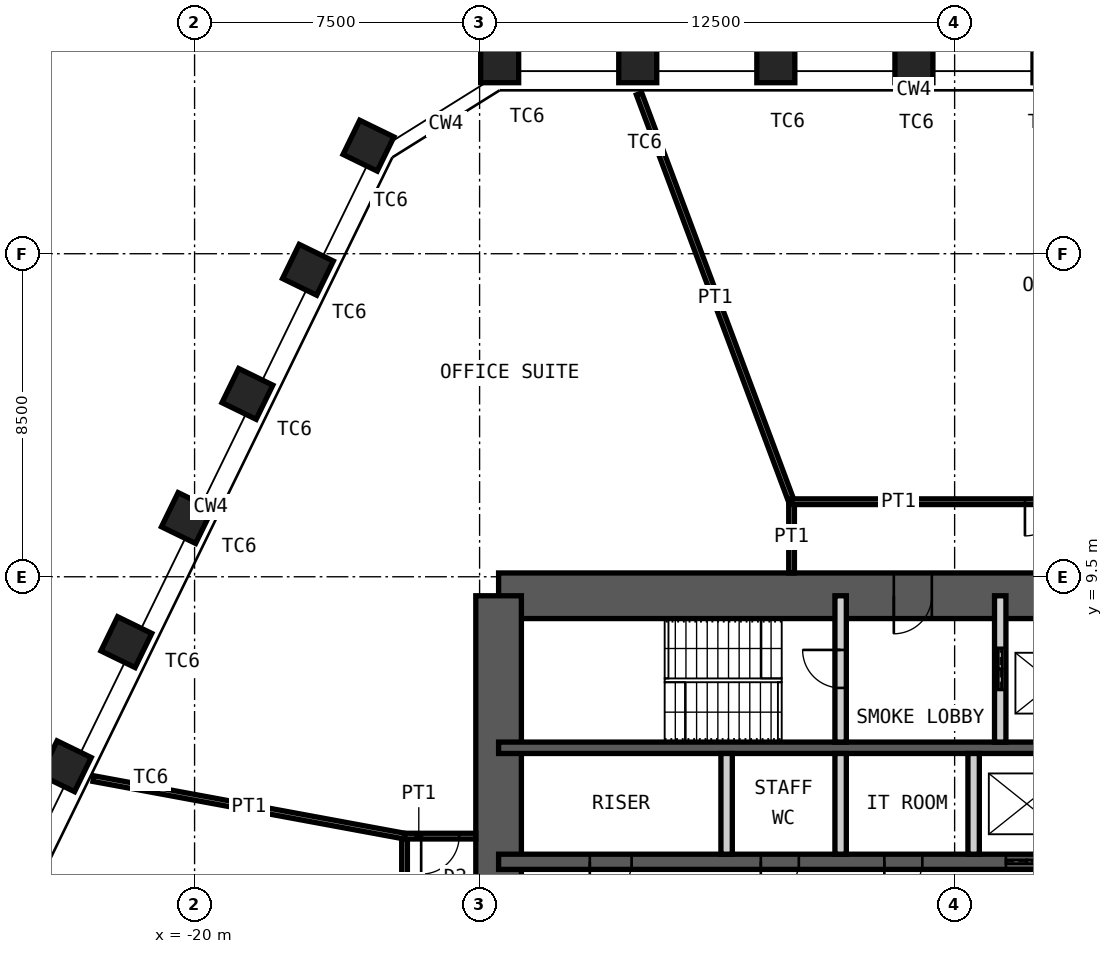
"""IFC4 building model, lengths in metres.
Left out: names, types, materials, properties, quantities, classifications, styles, units other than length and angle.
Written with IfcOpenShell. Run it as: python <this file> out.ifc"""

import sys

from ifc_helpers import new_model, si_unit, direction, frame, frame_2d, origin, origin_2d, place, context, subcontext, project, spatial, rectangle, hollow_rectangle, extrude, element, fill, save


model = new_model("IFC4")
c1 = context("Model", 3, precision=1e-05, world=origin(), true_north=direction((0.0, 1.0)))
c2 = subcontext(c1, "Body", "Model", "MODEL_VIEW")
j1 = project(units=[si_unit("LENGTHUNIT", "METRE"), si_unit("PLANEANGLEUNIT", "RADIAN")], contexts=[c1])
p1 = place(None, origin())
s1 = spatial("IfcSite", under=j1, at=p1, CompositionType="ELEMENT")
p2 = place(p1, origin())
s2 = spatial("IfcBuilding", under=s1, at=p2, CompositionType="ELEMENT")
p3 = place(p2, frame((0.0, 0.0, 247.6)))
s3 = spatial("IfcBuildingStorey", under=s2, at=p3, CompositionType="ELEMENT", Elevation=247.6)
for number, where, z_axis, x_axis in (
    (1, (-11.972, 23.0, 0.0), (0.0, 0.0, 1.0), (-1.0, 0.0, 0.0)),
    (2, (-8.338, 23.0, 0.0), (0.0, 0.0, 1.0), (-1.0, 0.0, 0.0)),
    (3, (-4.705, 23.0, 0.0), (0.0, 0.0, 1.0), (-1.0, 0.0, 0.0)),
    (4, (-1.071, 23.0, 0.0), (0.0, 0.0, 1.0), (-1.0, 0.0, 0.0)),
    (5, (-23.388, 4.514, 0.0), (0.0, 0.0, 1.0), (-0.438, -0.899, 0.0)),
    (6, (-21.795, 7.78, 0.0), (0.0, 0.0, 1.0), (-0.438, -0.899, 0.0)),
    (7, (-20.203, 11.045, 0.0), (0.0, 0.0, 1.0), (-0.438, -0.899, 0.0)),
    (8, (-18.61, 14.311, 0.0), (0.0, 0.0, 1.0), (-0.438, -0.899, 0.0)),
    (9, (-17.017, 17.577, 0.0), (0.0, 0.0, 1.0), (-0.438, -0.899, 0.0)),
    (10, (-15.424, 20.843, 0.0), (0.0, 0.0, 1.0), (-0.438, -0.899, 0.0)),
):
    element("IfcColumn", number, at=place(p3, frame(where, z_axis=z_axis, x_axis=x_axis)), inside=s3, PredefinedType="COLUMN", context=c2, shape_type="SweptSolid", body=[
        extrude(hollow_rectangle(XDim=1.0, YDim=1.0, WallThickness=0.06, at=origin_2d()), origin(), (0.0, 0.0, 1.0), 4.2),
    ])
p4 = place(p3, frame((-12.0, 9.0, 0.0), z_axis=(0.0, 0.0, 1.0), x_axis=(1.0, 0.0, 0.0)))
e11 = element("IfcWall", 11, at=p4, inside=s3, PredefinedType="SHEAR", context=c2, shape_type="SweptSolid", body=[
    extrude(rectangle(XDim=24.0, YDim=1.2, at=frame_2d((12.0, 0.0))), origin(), (0.0, 0.0, 1.0), 4.2),
])
p5 = place(p4, frame((10.4, 0.0, 0.0)))
e12 = element("IfcOpeningElement", 12, at=p5, cuts=e11, PredefinedType="OPENING", context=c2, shape_type="SweptSolid", body=[
    extrude(rectangle(XDim=1.0, YDim=2.1, at=frame_2d((0.5, 1.05))), frame((0.0, 0.61, 0.0), z_axis=(0.0, -1.0, 0.0), x_axis=(1.0, 0.0, 0.0)), (0.0, 0.0, 1.0), 1.22),
])
p6 = place(p4, frame((17.6, 0.0, 0.0)))
e13 = element("IfcOpeningElement", 13, at=p6, cuts=e11, PredefinedType="OPENING", context=c2, shape_type="SweptSolid", body=[
    extrude(rectangle(XDim=0.9, YDim=2.1, at=frame_2d((0.45, 1.05))), frame((0.0, 0.61, 0.0), z_axis=(0.0, -1.0, 0.0), x_axis=(1.0, 0.0, 0.0)), (0.0, 0.0, 1.0), 1.22),
])
p7 = place(p4, frame((21.9, 0.0, 0.0)))
e14 = element("IfcOpeningElement", 14, at=p7, cuts=e11, PredefinedType="OPENING", context=c2, shape_type="SweptSolid", body=[
    extrude(rectangle(XDim=0.9, YDim=2.1, at=frame_2d((0.45, 1.05))), frame((0.0, 0.61, 0.0), z_axis=(0.0, -1.0, 0.0), x_axis=(1.0, 0.0, 0.0)), (0.0, 0.0, 1.0), 1.22),
])
p8 = place(p3, frame((-12.0, -9.0, 0.0), z_axis=(0.0, 0.0, 1.0), x_axis=(0.0, 1.0, 0.0)))
e15 = element("IfcWall", 15, at=p8, inside=s3, PredefinedType="SHEAR", context=c2, shape_type="SweptSolid", body=[
    extrude(rectangle(XDim=18.0, YDim=1.2, at=frame_2d((9.0, 0.0))), origin(), (0.0, 0.0, 1.0), 4.2),
])
p9 = place(p8, frame((8.1, 0.0, 0.0)))
e16 = element("IfcOpeningElement", 16, at=p9, cuts=e15, PredefinedType="OPENING", context=c2, shape_type="SweptSolid", body=[
    extrude(rectangle(XDim=1.8, YDim=2.1, at=frame_2d((0.9, 1.05))), frame((0.0, 0.61, 0.0), z_axis=(0.0, -1.0, 0.0), x_axis=(1.0, 0.0, 0.0)), (0.0, 0.0, 1.0), 1.22),
])
p10 = place(p3, frame((-12.0, 5.0, 0.0), z_axis=(0.0, 0.0, 1.0), x_axis=(1.0, 0.0, 0.0)))
e17 = element("IfcWall", 17, at=p10, inside=s3, PredefinedType="SHEAR", context=c2, shape_type="SweptSolid", body=[
    extrude(rectangle(XDim=24.0, YDim=0.3, at=frame_2d((12.0, 0.0))), origin(), (0.0, 0.0, 1.0), 4.2),
])
p11 = place(p3, frame((-12.0, 2.0, 0.0), z_axis=(0.0, 0.0, 1.0), x_axis=(1.0, 0.0, 0.0)))
e18 = element("IfcWall", 18, at=p11, inside=s3, PredefinedType="SHEAR", context=c2, shape_type="SweptSolid", body=[
    extrude(rectangle(XDim=24.0, YDim=0.4, at=frame_2d((12.0, 0.0))), origin(), (0.0, 0.0, 1.0), 4.2),
])
p12 = place(p11, frame((2.4, 0.0, 0.0)))
e19 = element("IfcOpeningElement", 19, at=p12, cuts=e18, PredefinedType="OPENING", context=c2, shape_type="SweptSolid", body=[
    extrude(rectangle(XDim=1.1, YDim=2.1, at=frame_2d((0.55, 1.05))), frame((0.0, 0.21, 0.0), z_axis=(0.0, -1.0, 0.0), x_axis=(1.0, 0.0, 0.0)), (0.0, 0.0, 1.0), 0.42),
])
p13 = place(p11, frame((22.0, 0.0, 0.0)))
e20 = element("IfcOpeningElement", 20, at=p13, cuts=e18, PredefinedType="OPENING", context=c2, shape_type="SweptSolid", body=[
    extrude(rectangle(XDim=1.1, YDim=2.1, at=frame_2d((0.55, 1.05))), frame((0.0, 0.21, 0.0), z_axis=(0.0, -1.0, 0.0), x_axis=(1.0, 0.0, 0.0)), (0.0, 0.0, 1.0), 0.42),
])
p14 = place(p11, frame((10.15, 0.0, 0.0)))
e21 = element("IfcOpeningElement", 21, at=p14, cuts=e18, PredefinedType="OPENING", context=c2, shape_type="SweptSolid", body=[
    extrude(rectangle(XDim=1.0, YDim=2.1, at=frame_2d((0.5, 1.05))), frame((0.0, 0.21, 0.0), z_axis=(0.0, -1.0, 0.0), x_axis=(1.0, 0.0, 0.0)), (0.0, 0.0, 1.0), 0.42),
])
p15 = place(p11, frame((6.9, 0.0, 0.0)))
e22 = element("IfcOpeningElement", 22, at=p15, cuts=e18, PredefinedType="OPENING", context=c2, shape_type="SweptSolid", body=[
    extrude(rectangle(XDim=1.0, YDim=2.1, at=frame_2d((0.5, 1.05))), frame((0.0, 0.21, 0.0), z_axis=(0.0, -1.0, 0.0), x_axis=(1.0, 0.0, 0.0)), (0.0, 0.0, 1.0), 0.42),
])
p16 = place(p11, frame((13.35, 0.0, 0.0)))
e23 = element("IfcOpeningElement", 23, at=p16, cuts=e18, PredefinedType="OPENING", context=c2, shape_type="SweptSolid", body=[
    extrude(rectangle(XDim=1.1, YDim=2.4, at=frame_2d((0.55, 1.2))), frame((0.0, 0.21, 0.0), z_axis=(0.0, -1.0, 0.0), x_axis=(1.0, 0.0, 0.0)), (0.0, 0.0, 1.0), 0.42),
])
p17 = place(p11, frame((16.15, 0.0, 0.0)))
e24 = element("IfcOpeningElement", 24, at=p17, cuts=e18, PredefinedType="OPENING", context=c2, shape_type="SweptSolid", body=[
    extrude(rectangle(XDim=1.1, YDim=2.4, at=frame_2d((0.55, 1.2))), frame((0.0, 0.21, 0.0), z_axis=(0.0, -1.0, 0.0), x_axis=(1.0, 0.0, 0.0)), (0.0, 0.0, 1.0), 0.42),
])
p18 = place(p11, frame((18.95, 0.0, 0.0)))
e25 = element("IfcOpeningElement", 25, at=p18, cuts=e18, PredefinedType="OPENING", context=c2, shape_type="SweptSolid", body=[
    extrude(rectangle(XDim=1.1, YDim=2.4, at=frame_2d((0.55, 1.2))), frame((0.0, 0.21, 0.0), z_axis=(0.0, -1.0, 0.0), x_axis=(1.0, 0.0, 0.0)), (0.0, 0.0, 1.0), 0.42),
])
p19 = place(p3, frame((-3.0, 5.15, 0.0), z_axis=(0.0, 0.0, 1.0), x_axis=(0.0, 1.0, 0.0)))
e26 = element("IfcWall", 26, at=p19, inside=s3, PredefinedType="PARTITIONING", context=c2, shape_type="SweptSolid", body=[
    extrude(rectangle(XDim=3.85, YDim=0.3, at=frame_2d((1.925, 0.0))), origin(), (0.0, 0.0, 1.0), 3.98),
])
p20 = place(p19, frame((1.425, 0.0, 0.0)))
e27 = element("IfcOpeningElement", 27, at=p20, cuts=e26, PredefinedType="OPENING", context=c2, shape_type="SweptSolid", body=[
    extrude(rectangle(XDim=1.0, YDim=2.1, at=frame_2d((0.5, 1.05))), frame((0.0, 0.16, 0.0), z_axis=(0.0, -1.0, 0.0), x_axis=(1.0, 0.0, 0.0)), (0.0, 0.0, 1.0), 0.32),
])
p21 = place(p3, frame((1.2, 5.15, 0.0), z_axis=(0.0, 0.0, 1.0), x_axis=(0.0, 1.0, 0.0)))
e28 = element("IfcWall", 28, at=p21, inside=s3, PredefinedType="PARTITIONING", context=c2, shape_type="SweptSolid", body=[
    extrude(rectangle(XDim=3.85, YDim=0.3, at=frame_2d((1.925, 0.0))), origin(), (0.0, 0.0, 1.0), 3.98),
])
p22 = place(p21, frame((1.375, 0.0, 0.0)))
e29 = element("IfcOpeningElement", 29, at=p22, cuts=e28, PredefinedType="OPENING", context=c2, shape_type="SweptSolid", body=[
    extrude(rectangle(XDim=1.1, YDim=2.4, at=frame_2d((0.55, 1.2))), frame((0.0, 0.16, 0.0), z_axis=(0.0, -1.0, 0.0), x_axis=(1.0, 0.0, 0.0)), (0.0, 0.0, 1.0), 0.32),
])
for number, where, z_axis, x_axis in (
    (30, (-6.0, 2.2, 0.0), (0.0, 0.0, 1.0), (0.0, 1.0, 0.0)),
    (31, (-3.0, 2.2, 0.0), (0.0, 0.0, 1.0), (0.0, 1.0, 0.0)),
    (32, (0.5, 2.2, 0.0), (0.0, 0.0, 1.0), (0.0, 1.0, 0.0)),
):
    element("IfcWall", number, at=place(p3, frame(where, z_axis=z_axis, x_axis=x_axis)), inside=s3, PredefinedType="PARTITIONING", context=c2, shape_type="SweptSolid", body=[
        extrude(rectangle(XDim=2.65, YDim=0.3, at=frame_2d((1.325, 0.0))), origin(), (0.0, 0.0, 1.0), 3.98),
    ])
p23 = place(p3, frame((-14.475, -3.736, 0.0), z_axis=(0.0, 0.0, 1.0), x_axis=(0.0, 1.0, 0.0)))
e33 = element("IfcWall", 33, at=p23, inside=s3, PredefinedType="PARTITIONING", context=c2, shape_type="SweptSolid", body=[
    extrude(rectangle(XDim=6.412, YDim=0.15, at=frame_2d((3.206, 0.0))), origin(), (0.0, 0.0, 1.0), 4.03),
])
p24 = place(p23, frame((2.706, 0.0, 0.0)))
e34 = element("IfcOpeningElement", 34, at=p24, cuts=e33, PredefinedType="OPENING", context=c2, shape_type="SweptSolid", body=[
    extrude(rectangle(XDim=1.0, YDim=2.4, at=frame_2d((0.5, 1.2))), frame((0.0, 0.085, 0.0), z_axis=(0.0, -1.0, 0.0), x_axis=(1.0, 0.0, 0.0)), (0.0, 0.0, 1.0), 0.17),
])
p25 = place(p3, frame((-22.661, 4.189, 0.0), z_axis=(0.0, 0.0, 1.0), x_axis=(0.983345347199, -0.181746879316, 0.0)))
e35 = element("IfcWall", 35, at=p25, inside=s3, PredefinedType="PARTITIONING", context=c2, shape_type="SweptSolid", body=[
    extrude(rectangle(XDim=8.324, YDim=0.15, at=frame_2d((4.162, 0.0))), origin(), (0.0, 0.0, 1.0), 2.93),
])
p26 = place(p3, frame((-14.475, 2.676, 0.0), z_axis=(0.0, 0.0, 1.0), x_axis=(1.0, 0.0, 0.0)))
e36 = element("IfcWall", 36, at=p26, inside=s3, PredefinedType="PARTITIONING", context=c2, shape_type="SweptSolid", body=[
    extrude(rectangle(XDim=1.875, YDim=0.15, at=frame_2d((0.938, 0.0))), origin(), (0.0, 0.0, 1.0), 2.93),
])
p27 = place(p26, frame((0.438, 0.0, 0.0)))
e37 = element("IfcOpeningElement", 37, at=p27, cuts=e36, PredefinedType="OPENING", context=c2, shape_type="SweptSolid", body=[
    extrude(rectangle(XDim=1.0, YDim=2.4, at=frame_2d((0.5, 1.2))), frame((0.0, 0.085, 0.0), z_axis=(0.0, -1.0, 0.0), x_axis=(1.0, 0.0, 0.0)), (0.0, 0.0, 1.0), 0.17),
])
p28 = place(p3, frame((-4.291, 9.6, 0.0), z_axis=(0.0, 0.0, 1.0), x_axis=(0.0, 1.0, 0.0)))
e38 = element("IfcWall", 38, at=p28, inside=s3, PredefinedType="PARTITIONING", context=c2, shape_type="SweptSolid", body=[
    extrude(rectangle(XDim=1.875, YDim=0.15, at=frame_2d((0.938, 0.0))), origin(), (0.0, 0.0, 1.0), 4.03),
])
p29 = place(p3, frame((-8.303, 22.206, 0.0), z_axis=(0.0, 0.0, 1.0), x_axis=(0.350242883069, -0.936658914899, 0.0)))
e39 = element("IfcWall", 39, at=p29, inside=s3, PredefinedType="PARTITIONING", context=c2, shape_type="SweptSolid", body=[
    extrude(rectangle(XDim=11.457, YDim=0.15, at=frame_2d((5.729, 0.0))), origin(), (0.0, 0.0, 1.0), 2.93),
])
p30 = place(p3, frame((-4.291, 11.475, 0.0), z_axis=(0.0, 0.0, 1.0), x_axis=(1.0, 0.0, 0.0)))
e40 = element("IfcWall", 40, at=p30, inside=s3, PredefinedType="PARTITIONING", context=c2, shape_type="SweptSolid", body=[
    extrude(rectangle(XDim=14.082, YDim=0.15, at=frame_2d((7.041, 0.0))), origin(), (0.0, 0.0, 1.0), 4.03),
])
p31 = place(p30, frame((6.141, 0.0, 0.0)))
e41 = element("IfcOpeningElement", 41, at=p31, cuts=e40, PredefinedType="OPENING", context=c2, shape_type="SweptSolid", body=[
    extrude(rectangle(XDim=1.8, YDim=2.4, at=frame_2d((0.9, 1.2))), frame((0.0, 0.085, 0.0), z_axis=(0.0, -1.0, 0.0), x_axis=(1.0, 0.0, 0.0)), (0.0, 0.0, 1.0), 0.17),
])
p32 = place(p5, origin())
e42 = element("IfcDoor", 42, at=p32, inside=s3, OperationType="SINGLE_SWING_LEFT", PredefinedType="DOOR", context=c2, shape_type="SweptSolid", body=[
    extrude(rectangle(XDim=1.0, YDim=2.1, at=frame_2d((0.5, 1.05))), frame((0.0, 0.025, 0.0), z_axis=(0.0, -1.0, 0.0), x_axis=(1.0, 0.0, 0.0)), (0.0, 0.0, 1.0), 0.05),
])
fill(e12, e42)
p33 = place(p20, origin())
e43 = element("IfcDoor", 43, at=p33, inside=s3, OperationType="SINGLE_SWING_LEFT", PredefinedType="DOOR", context=c2, shape_type="SweptSolid", body=[
    extrude(rectangle(XDim=1.0, YDim=2.1, at=frame_2d((0.5, 1.05))), frame((0.0, 0.025, 0.0), z_axis=(0.0, -1.0, 0.0), x_axis=(1.0, 0.0, 0.0)), (0.0, 0.0, 1.0), 0.05),
])
fill(e27, e43)
p34 = place(p12, origin())
e44 = element("IfcDoor", 44, at=p34, inside=s3, OperationType="SINGLE_SWING_LEFT", PredefinedType="DOOR", context=c2, shape_type="SweptSolid", body=[
    extrude(rectangle(XDim=1.1, YDim=2.1, at=frame_2d((0.55, 1.05))), frame((0.0, 0.025, 0.0), z_axis=(0.0, -1.0, 0.0), x_axis=(1.0, 0.0, 0.0)), (0.0, 0.0, 1.0), 0.05),
])
fill(e19, e44)
p35 = place(p14, origin())
e45 = element("IfcDoor", 45, at=p35, inside=s3, OperationType="SINGLE_SWING_LEFT", PredefinedType="DOOR", context=c2, shape_type="SweptSolid", body=[
    extrude(rectangle(XDim=1.0, YDim=2.1, at=frame_2d((0.5, 1.05))), frame((0.0, 0.025, 0.0), z_axis=(0.0, -1.0, 0.0), x_axis=(1.0, 0.0, 0.0)), (0.0, 0.0, 1.0), 0.05),
])
fill(e21, e45)
p36 = place(p22, origin())
e46 = element("IfcDoor", 46, at=p36, inside=s3, OperationType="DOUBLE_DOOR_SLIDING", PredefinedType="DOOR", context=c2, shape_type="SweptSolid", body=[
    extrude(rectangle(XDim=1.1, YDim=2.4, at=frame_2d((0.55, 1.2))), frame((0.0, 0.025, 0.0), z_axis=(0.0, -1.0, 0.0), x_axis=(1.0, 0.0, 0.0)), (0.0, 0.0, 1.0), 0.05),
])
fill(e29, e46)
p37 = place(p15, origin())
e47 = element("IfcDoor", 47, at=p37, inside=s3, OperationType="SINGLE_SWING_LEFT", PredefinedType="DOOR", context=c2, shape_type="SweptSolid", body=[
    extrude(rectangle(XDim=1.0, YDim=2.1, at=frame_2d((0.5, 1.05))), frame((0.0, 0.025, 0.0), z_axis=(0.0, -1.0, 0.0), x_axis=(1.0, 0.0, 0.0)), (0.0, 0.0, 1.0), 0.05),
])
fill(e22, e47)
p38 = place(p16, origin())
e48 = element("IfcDoor", 48, at=p38, inside=s3, OperationType="DOUBLE_DOOR_SLIDING", PredefinedType="DOOR", context=c2, shape_type="SweptSolid", body=[
    extrude(rectangle(XDim=1.1, YDim=2.4, at=frame_2d((0.55, 1.2))), frame((0.0, 0.025, 0.0), z_axis=(0.0, -1.0, 0.0), x_axis=(1.0, 0.0, 0.0)), (0.0, 0.0, 1.0), 0.05),
])
fill(e23, e48)
p39 = place(p27, origin())
e49 = element("IfcDoor", 49, at=p39, inside=s3, OperationType="SINGLE_SWING_LEFT", PredefinedType="DOOR", context=c2, shape_type="SweptSolid", body=[
    extrude(rectangle(XDim=1.0, YDim=2.4, at=frame_2d((0.5, 1.2))), frame((0.0, 0.025, 0.0), z_axis=(0.0, -1.0, 0.0), x_axis=(1.0, 0.0, 0.0)), (0.0, 0.0, 1.0), 0.05),
])
fill(e37, e49)
p40 = place(p31, origin())
e50 = element("IfcDoor", 50, at=p40, inside=s3, OperationType="DOUBLE_DOOR_DOUBLE_SWING", PredefinedType="DOOR", context=c2, shape_type="SweptSolid", body=[
    extrude(rectangle(XDim=1.8, YDim=2.4, at=frame_2d((0.9, 1.2))), frame((0.0, 0.025, 0.0), z_axis=(0.0, -1.0, 0.0), x_axis=(1.0, 0.0, 0.0)), (0.0, 0.0, 1.0), 0.05),
])
fill(e41, e50)
save(model, sys.argv[1])
